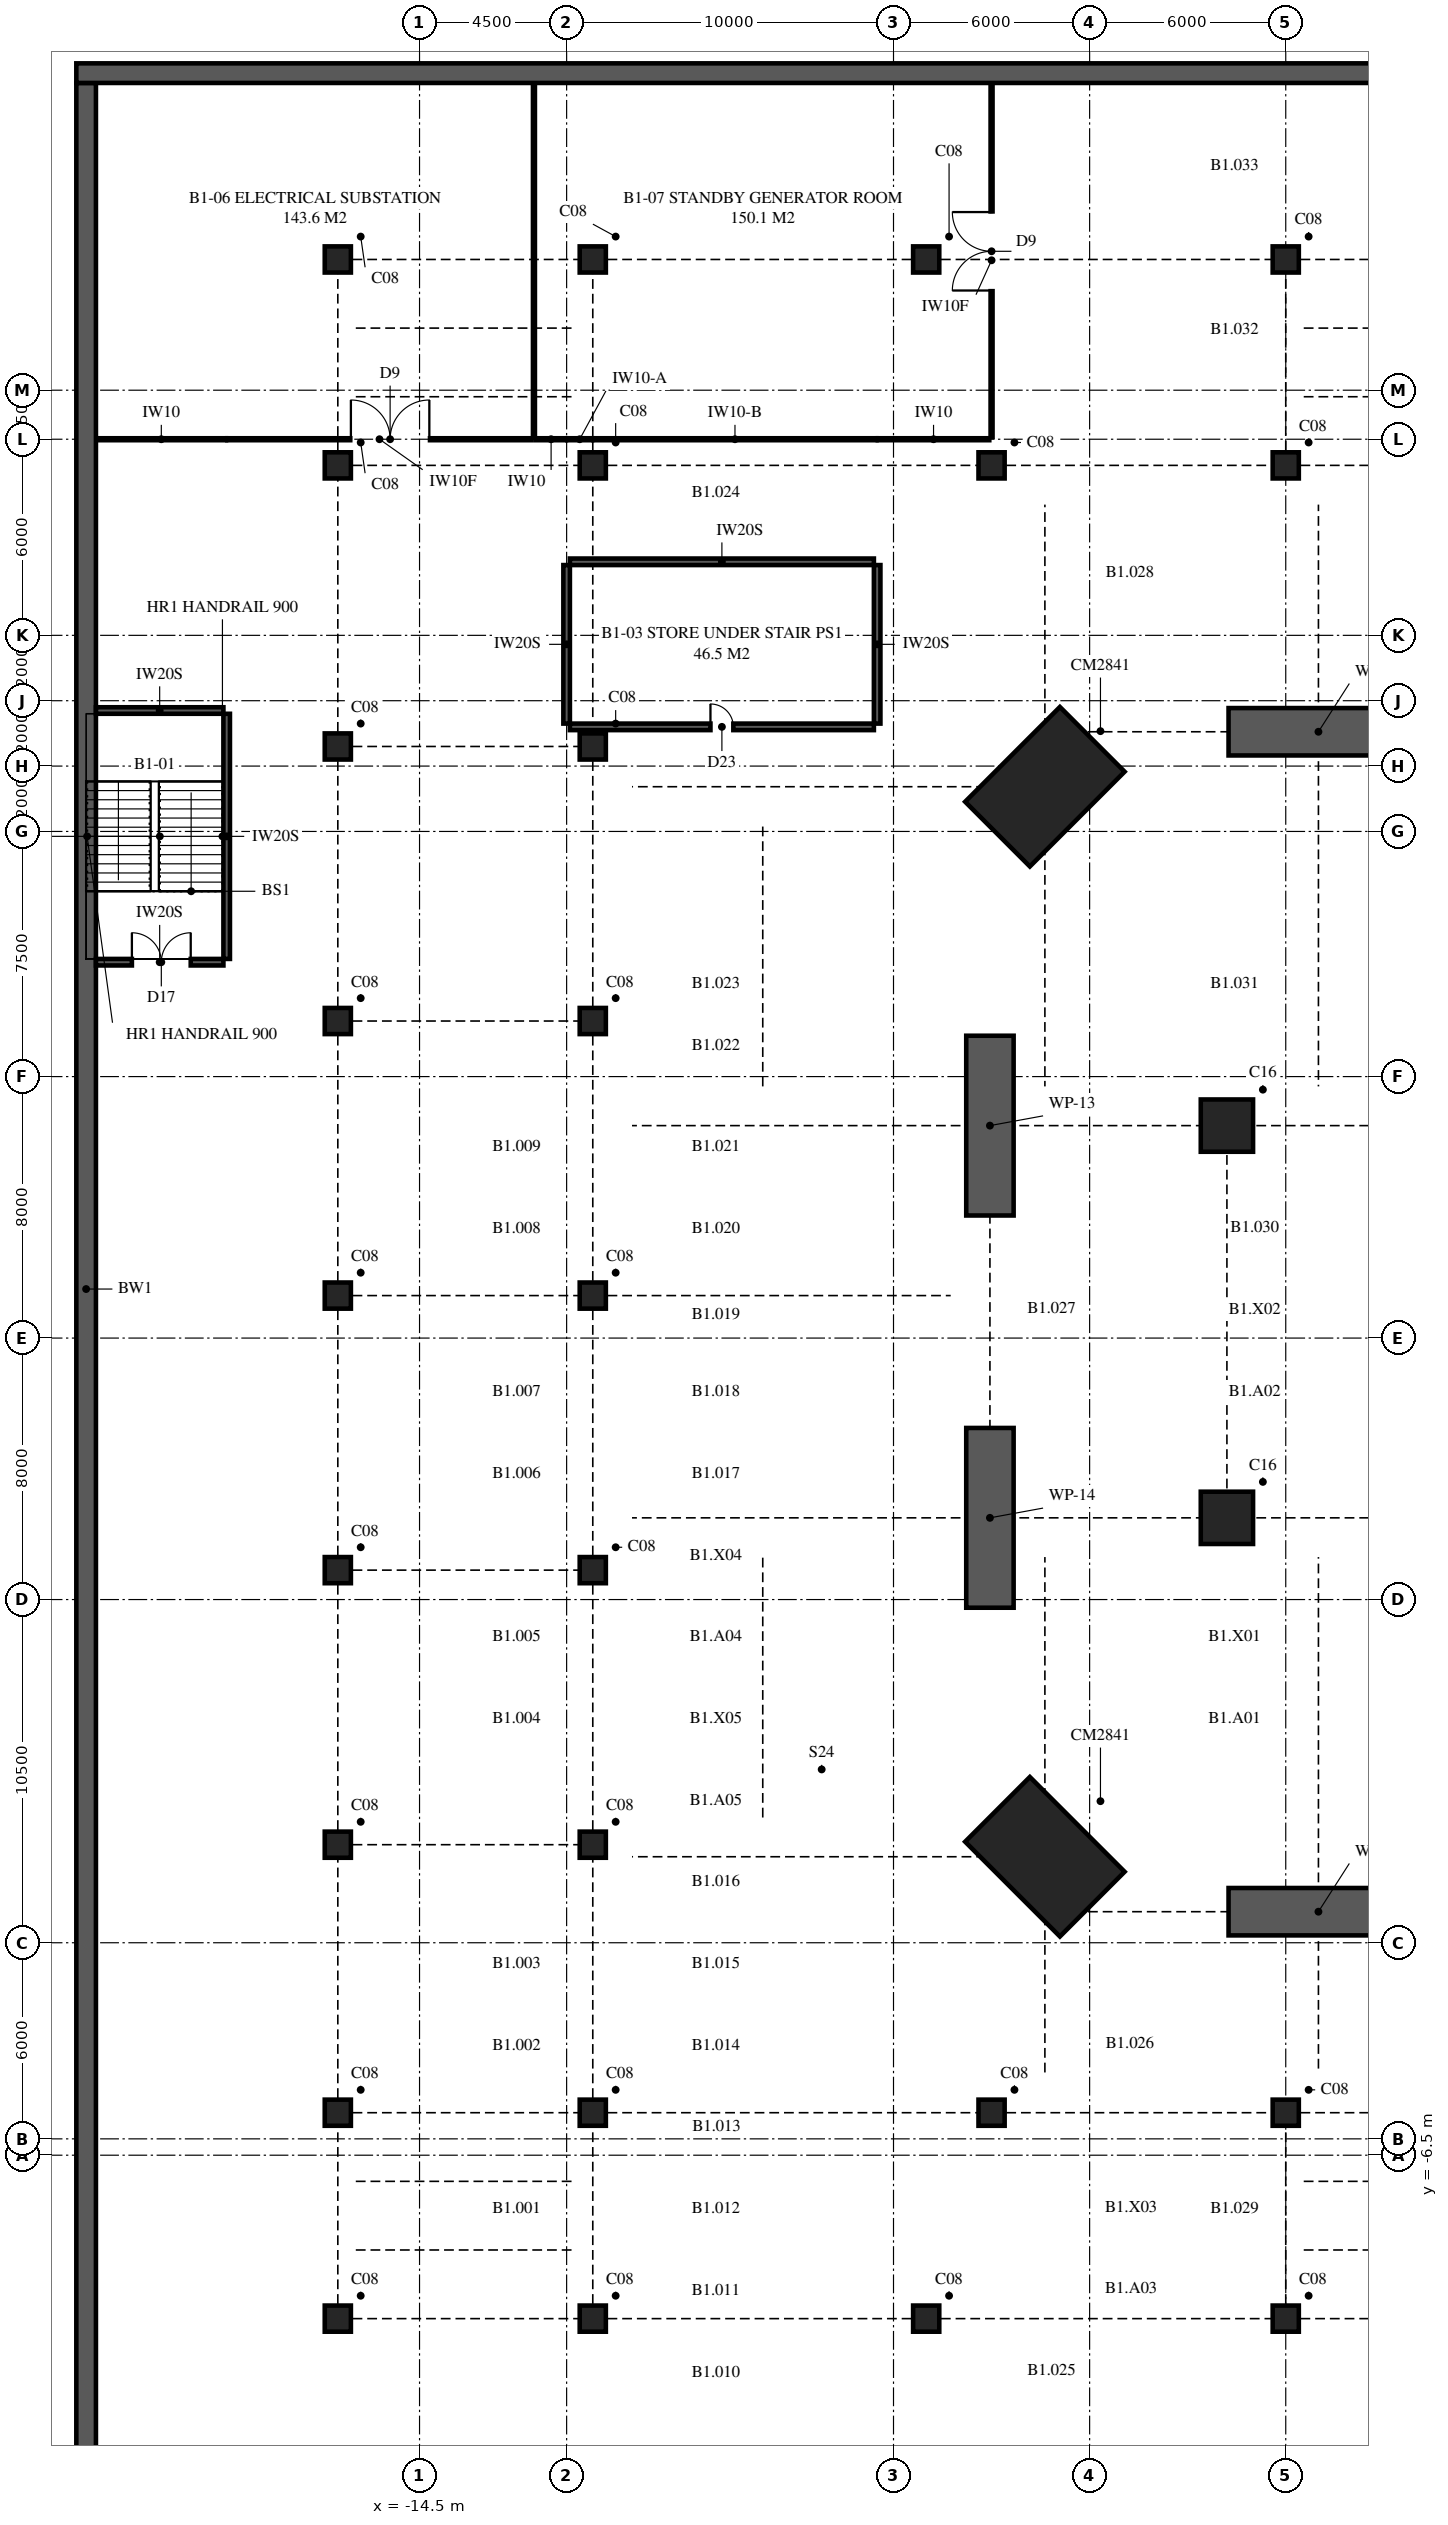
"""IFC4 building model, lengths in metres.
Left out: names, types, materials, properties, quantities, classifications, styles, units other than length and angle.
Written with IfcOpenShell. Run it as: python <this file> out.ifc"""

import sys

from ifc_helpers import new_model, si_unit, direction, frame, frame_2d, origin, origin_2d, place, context, subcontext, project, spatial, polyline, rectangle, outline, extrude, element, fill, save


model = new_model("IFC4")
c1 = context("Model", 3, precision=1e-05, world=origin(), true_north=direction((0.0, 1.0)))
c2 = subcontext(c1, "Body", "Model", "MODEL_VIEW")
j1 = project(units=[si_unit("LENGTHUNIT", "METRE"), si_unit("PLANEANGLEUNIT", "RADIAN")], contexts=[c1])
p1 = place(None, origin())
s1 = spatial("IfcSite", under=j1, at=p1, CompositionType="ELEMENT")
p2 = place(p1, origin())
s2 = spatial("IfcBuilding", under=s1, at=p2, CompositionType="ELEMENT")
p3 = place(p2, frame((0.0, 0.0, -4.0)))
s3 = spatial("IfcBuildingStorey", under=s2, at=p3, CompositionType="ELEMENT", Elevation=-4.0)
p4 = place(p3, frame((75.0, 57.2, 0.0), z_axis=(0.0, 0.0, 1.0), x_axis=(-1.0, 0.0, 0.0)))
e1 = element("IfcWall", 1, at=p4, inside=s3, PredefinedType="SOLIDWALL", context=c2, shape_type="SweptSolid", body=[
    extrude(rectangle(XDim=100.0, YDim=0.6, at=frame_2d((50.0, 0.0))), origin(), (0.0, 0.0, 1.0), 4.0),
])
p5 = place(p3, frame((-24.7, 56.9, 0.0), z_axis=(0.0, 0.0, 1.0), x_axis=(0.0, -1.0, 0.0)))
e2 = element("IfcWall", 2, at=p5, inside=s3, PredefinedType="SOLIDWALL", context=c2, shape_type="SweptSolid", body=[
    extrude(rectangle(XDim=73.8, YDim=0.6, at=frame_2d((36.9, 0.0))), origin(), (0.0, 0.0, 1.0), 4.0),
])
for number, where, z_axis, x_axis in (
    (3, (4.631, 2.631, 0.0), (0.0, 0.0, 1.0), (0.707, 0.707, 0.0)),
    (4, (4.631, 35.369, 0.0), (0.0, 0.0, 1.0), (0.707, -0.707, 0.0)),
):
    element("IfcColumn", number, at=place(p3, frame(where, z_axis=z_axis, x_axis=x_axis)), inside=s3, PredefinedType="COLUMN", context=c2, shape_type="SweptSolid", body=[
        extrude(rectangle(XDim=2.8, YDim=4.1, at=origin_2d()), origin(), (0.0, 0.0, 1.0), 4.0),
    ])
for number, where, z_axis, x_axis in (
    (5, (10.2, 13.0, 0.0), (0.0, 0.0, 1.0), (1.0, 0.0, 0.0)),
    (6, (10.2, 25.0, 0.0), (0.0, 0.0, 1.0), (1.0, 0.0, 0.0)),
):
    element("IfcColumn", number, at=place(p3, frame(where, z_axis=z_axis, x_axis=x_axis)), inside=s3, PredefinedType="COLUMN", context=c2, shape_type="SweptSolid", body=[
        extrude(rectangle(XDim=1.6, YDim=1.6, at=origin_2d()), origin(), (0.0, 0.0, 1.0), 4.0),
    ])
for number, where, z_axis, x_axis in (
    (7, (-9.2, -5.2, 0.0), (0.0, 0.0, 1.0), (1.0, 0.0, 0.0)),
    (8, (3.0, -5.2, 0.0), (0.0, 0.0, 1.0), (1.0, 0.0, 0.0)),
    (9, (12.0, -5.2, 0.0), (0.0, 0.0, 1.0), (1.0, 0.0, 0.0)),
    (10, (-9.2, 3.0, 0.0), (0.0, 0.0, 1.0), (1.0, 0.0, 0.0)),
    (11, (-9.2, 11.4, 0.0), (0.0, 0.0, 1.0), (1.0, 0.0, 0.0)),
    (12, (-9.2, 19.8, 0.0), (0.0, 0.0, 1.0), (1.0, 0.0, 0.0)),
    (13, (-9.2, 28.2, 0.0), (0.0, 0.0, 1.0), (1.0, 0.0, 0.0)),
    (14, (-9.2, 36.6, 0.0), (0.0, 0.0, 1.0), (1.0, 0.0, 0.0)),
    (15, (-9.2, 45.2, 0.0), (0.0, 0.0, 1.0), (1.0, 0.0, 0.0)),
    (16, (3.0, 45.2, 0.0), (0.0, 0.0, 1.0), (1.0, 0.0, 0.0)),
    (17, (12.0, 45.2, 0.0), (0.0, 0.0, 1.0), (1.0, 0.0, 0.0)),
):
    element("IfcColumn", number, at=place(p3, frame(where, z_axis=z_axis, x_axis=x_axis)), inside=s3, PredefinedType="COLUMN", context=c2, shape_type="SweptSolid", body=[
        extrude(rectangle(XDim=0.8, YDim=0.8, at=origin_2d()), origin(), (0.0, 0.0, 1.0), 4.0),
    ])
for number, where, z_axis, x_axis in (
    (18, (-17.0, -11.5, 0.0), (0.0, 0.0, 1.0), (1.0, 0.0, 0.0)),
    (19, (-17.0, -5.2, 0.0), (0.0, 0.0, 1.0), (1.0, 0.0, 0.0)),
    (20, (-17.0, 3.0, 0.0), (0.0, 0.0, 1.0), (1.0, 0.0, 0.0)),
    (21, (-17.0, 11.4, 0.0), (0.0, 0.0, 1.0), (1.0, 0.0, 0.0)),
    (22, (-17.0, 19.8, 0.0), (0.0, 0.0, 1.0), (1.0, 0.0, 0.0)),
    (23, (-17.0, 28.2, 0.0), (0.0, 0.0, 1.0), (1.0, 0.0, 0.0)),
    (24, (-17.0, 36.6, 0.0), (0.0, 0.0, 1.0), (1.0, 0.0, 0.0)),
    (25, (-17.0, 45.2, 0.0), (0.0, 0.0, 1.0), (1.0, 0.0, 0.0)),
    (26, (-17.0, 51.5, 0.0), (0.0, 0.0, 1.0), (1.0, 0.0, 0.0)),
    (27, (-9.2, -11.5, 0.0), (0.0, 0.0, 1.0), (1.0, 0.0, 0.0)),
    (28, (-9.2, 51.5, 0.0), (0.0, 0.0, 1.0), (1.0, 0.0, 0.0)),
    (29, (1.0, -11.5, 0.0), (0.0, 0.0, 1.0), (1.0, 0.0, 0.0)),
    (30, (1.0, 51.5, 0.0), (0.0, 0.0, 1.0), (1.0, 0.0, 0.0)),
    (31, (12.0, -11.5, 0.0), (0.0, 0.0, 1.0), (1.0, 0.0, 0.0)),
    (32, (12.0, 51.5, 0.0), (0.0, 0.0, 1.0), (1.0, 0.0, 0.0)),
):
    element("IfcColumn", number, at=place(p3, frame(where, z_axis=z_axis, x_axis=x_axis)), inside=s3, PredefinedType="COLUMN", context=c2, shape_type="SweptSolid", body=[
        extrude(rectangle(XDim=0.8, YDim=0.8, at=origin_2d()), origin(), (0.0, 0.0, 1.0), 3.6),
    ])
p6 = place(p3, frame((3.0, 46.05, 0.0), z_axis=(0.0, 0.0, 1.0), x_axis=(0.0, 1.0, 0.0)))
e33 = element("IfcWall", 33, at=p6, inside=s3, PredefinedType="PARTITIONING", context=c2, shape_type="SweptSolid", body=[
    extrude(outline(polyline([(0.0, 0.0), (10.85, 0.0), (10.85, 3.72), (6.01, 3.72), (6.01, 3.12), (4.89, 3.12), (4.89, 3.72), (0.41, 3.72), (0.41, 3.12), (0.0, 3.12), (0.0, 3.72), (0.0, 0.0)])), frame((0.0, 0.05, 0.0), z_axis=(0.0, -1.0, 0.0), x_axis=(1.0, 0.0, 0.0)), (0.0, 0.0, 1.0), 0.1),
])
p7 = place(p6, frame((4.5, 0.0, 0.0)))
e34 = element("IfcOpeningElement", 34, at=p7, cuts=e33, PredefinedType="OPENING", context=c2, shape_type="SweptSolid", body=[
    extrude(rectangle(XDim=2.4, YDim=2.4, at=frame_2d((1.2, 1.2))), frame((0.0, 0.06, 0.0), z_axis=(0.0, -1.0, 0.0), x_axis=(1.0, 0.0, 0.0)), (0.0, 0.0, 1.0), 0.12),
])
p8 = place(p3, frame((-20.4, 30.1, 0.0), z_axis=(0.0, 0.0, 1.0), x_axis=(0.0, 1.0, 0.0)))
e35 = element("IfcWall", 35, at=p8, inside=s3, PredefinedType="SOLIDWALL", context=c2, shape_type="SweptSolid", body=[
    extrude(rectangle(XDim=7.5, YDim=0.2, at=frame_2d((3.75, 0.0))), origin(), (0.0, 0.0, 1.0), 4.0),
])
p9 = place(p3, frame((-10.0, 37.3, 0.0), z_axis=(0.0, 0.0, 1.0), x_axis=(0.0, 1.0, 0.0)))
e36 = element("IfcWall", 36, at=p9, inside=s3, PredefinedType="SOLIDWALL", context=c2, shape_type="SweptSolid", body=[
    extrude(rectangle(XDim=4.85, YDim=0.2, at=frame_2d((2.425, 0.0))), origin(), (0.0, 0.0, 1.0), 4.0),
])
p10 = place(p3, frame((-20.4, 46.0, 0.0), z_axis=(0.0, 0.0, 1.0), x_axis=(1.0, 0.0, 0.0)))
e37 = element("IfcWall", 37, at=p10, inside=s3, PredefinedType="PARTITIONING", context=c2, shape_type="SweptSolid", body=[
    extrude(outline(polyline([(0.0, 0.0), (9.35, 0.0), (9.35, 3.72), (4.01, 3.72), (4.01, 3.12), (2.79, 3.12), (2.79, 3.72), (0.0, 3.72), (0.0, 0.0)])), frame((0.0, 0.05, 0.0), z_axis=(0.0, -1.0, 0.0), x_axis=(1.0, 0.0, 0.0)), (0.0, 0.0, 1.0), 0.1),
])
p11 = place(p10, frame((3.8, 0.0, 0.0)))
e38 = element("IfcOpeningElement", 38, at=p11, cuts=e37, PredefinedType="OPENING", context=c2, shape_type="SweptSolid", body=[
    extrude(rectangle(XDim=2.4, YDim=2.4, at=frame_2d((1.2, 1.2))), frame((0.0, 0.06, 0.0), z_axis=(0.0, -1.0, 0.0), x_axis=(1.0, 0.0, 0.0)), (0.0, 0.0, 1.0), 0.12),
])
p12 = place(p3, frame((-10.95, 46.0, 0.0), z_axis=(0.0, 0.0, 1.0), x_axis=(1.0, 0.0, 0.0)))
e39 = element("IfcWall", 39, at=p12, inside=s3, PredefinedType="PARTITIONING", context=c2, shape_type="SweptSolid", body=[
    extrude(rectangle(XDim=0.95, YDim=0.1, at=frame_2d((0.475, 0.0))), origin(), (0.0, 0.0, 1.0), 3.72),
])
p13 = place(p3, frame((-0.5, 37.3, 0.0), z_axis=(0.0, 0.0, 1.0), x_axis=(0.0, 1.0, 0.0)))
e40 = element("IfcWall", 40, at=p13, inside=s3, PredefinedType="SOLIDWALL", context=c2, shape_type="SweptSolid", body=[
    extrude(rectangle(XDim=4.85, YDim=0.2, at=frame_2d((2.425, 0.0))), origin(), (0.0, 0.0, 1.0), 4.0),
])
p14 = place(p3, frame((-0.5, 46.0, 0.0), z_axis=(0.0, 0.0, 1.0), x_axis=(1.0, 0.0, 0.0)))
e41 = element("IfcWall", 41, at=p14, inside=s3, PredefinedType="PARTITIONING", context=c2, shape_type="SweptSolid", body=[
    extrude(outline(polyline([(0.0, 0.0), (3.45, 0.0), (3.45, 3.72), (3.45, 3.12), (0.0, 3.12), (0.0, 3.72), (0.0, 0.0)])), frame((0.0, 0.05, 0.0), z_axis=(0.0, -1.0, 0.0), x_axis=(1.0, 0.0, 0.0)), (0.0, 0.0, 1.0), 0.1),
])
p15 = place(p3, frame((-9.9, 37.2, 0.0), z_axis=(0.0, 0.0, 1.0), x_axis=(1.0, 0.0, 0.0)))
e42 = element("IfcWall", 42, at=p15, inside=s3, PredefinedType="SOLIDWALL", context=c2, shape_type="SweptSolid", body=[
    extrude(rectangle(XDim=9.3, YDim=0.2, at=frame_2d((4.65, 0.0))), origin(), (0.0, 0.0, 1.0), 4.0),
])
p16 = place(p15, frame((4.3, 0.0, 0.0)))
e43 = element("IfcOpeningElement", 43, at=p16, cuts=e42, PredefinedType="OPENING", context=c2, shape_type="SweptSolid", body=[
    extrude(rectangle(XDim=0.7, YDim=2.1, at=frame_2d((0.35, 1.05))), frame((0.0, 0.11, 0.0), z_axis=(0.0, -1.0, 0.0), x_axis=(1.0, 0.0, 0.0)), (0.0, 0.0, 1.0), 0.22),
])
p17 = place(p3, frame((-9.9, 42.25, 0.0), z_axis=(0.0, 0.0, 1.0), x_axis=(1.0, 0.0, 0.0)))
e44 = element("IfcWall", 44, at=p17, inside=s3, PredefinedType="SOLIDWALL", context=c2, shape_type="SweptSolid", body=[
    extrude(rectangle(XDim=9.3, YDim=0.2, at=frame_2d((4.65, 0.0))), origin(), (0.0, 0.0, 1.0), 4.0),
])
p18 = place(p3, frame((-10.0, 46.0, 0.0), z_axis=(0.0, 0.0, 1.0), x_axis=(1.0, 0.0, 0.0)))
e45 = element("IfcWall", 45, at=p18, inside=s3, PredefinedType="PARTITIONING", context=c2, shape_type="SweptSolid", body=[
    extrude(outline(polyline([(0.0, 0.0), (0.8, 0.0), (0.8, 3.12), (0.19, 3.12), (0.19, 3.72), (0.0, 3.72), (0.0, 0.0)])), frame((0.0, 0.05, 0.0), z_axis=(0.0, -1.0, 0.0), x_axis=(1.0, 0.0, 0.0)), (0.0, 0.0, 1.0), 0.1),
])
p19 = place(p3, frame((-9.2, 46.0, 0.0), z_axis=(0.0, 0.0, 1.0), x_axis=(1.0, 0.0, 0.0)))
e46 = element("IfcWall", 46, at=p19, inside=s3, PredefinedType="PARTITIONING", context=c2, shape_type="SweptSolid", body=[
    extrude(rectangle(XDim=8.7, YDim=0.1, at=frame_2d((4.35, 0.0))), origin(), (0.0, 0.0, 1.0), 3.12),
])
p20 = place(p3, frame((-24.4, 30.0, 0.0), z_axis=(0.0, 0.0, 1.0), x_axis=(1.0, 0.0, 0.0)))
e47 = element("IfcWall", 47, at=p20, inside=s3, PredefinedType="SOLIDWALL", context=c2, shape_type="SweptSolid", body=[
    extrude(rectangle(XDim=3.9, YDim=0.2, at=frame_2d((1.95, 0.0))), origin(), (0.0, 0.0, 1.0), 4.0),
])
p21 = place(p20, frame((1.1, 0.0, 0.0)))
e48 = element("IfcOpeningElement", 48, at=p21, cuts=e47, PredefinedType="OPENING", context=c2, shape_type="SweptSolid", body=[
    extrude(rectangle(XDim=1.8, YDim=2.2, at=frame_2d((0.9, 1.1))), frame((0.0, 0.11, 0.0), z_axis=(0.0, -1.0, 0.0), x_axis=(1.0, 0.0, 0.0)), (0.0, 0.0, 1.0), 0.22),
])
p22 = place(p3, frame((-24.4, 37.7, 0.0), z_axis=(0.0, 0.0, 1.0), x_axis=(1.0, 0.0, 0.0)))
e49 = element("IfcWall", 49, at=p22, inside=s3, PredefinedType="SOLIDWALL", context=c2, shape_type="SweptSolid", body=[
    extrude(rectangle(XDim=3.9, YDim=0.2, at=frame_2d((1.95, 0.0))), origin(), (0.0, 0.0, 1.0), 4.0),
])
p23 = place(p3, frame((-24.4, 46.0, 0.0), z_axis=(0.0, 0.0, 1.0), x_axis=(1.0, 0.0, 0.0)))
e50 = element("IfcWall", 50, at=p23, inside=s3, PredefinedType="PARTITIONING", context=c2, shape_type="SweptSolid", body=[
    extrude(rectangle(XDim=4.0, YDim=0.1, at=frame_2d((2.0, 0.0))), origin(), (0.0, 0.0, 1.0), 3.72),
])
p24 = place(p3, frame((-11.0, 46.05, 0.0), z_axis=(0.0, 0.0, 1.0), x_axis=(0.0, 1.0, 0.0)))
e51 = element("IfcWall", 51, at=p24, inside=s3, PredefinedType="PARTITIONING", context=c2, shape_type="SweptSolid", body=[
    extrude(outline(polyline([(0.0, 0.0), (10.85, 0.0), (10.85, 3.72), (6.01, 3.72), (6.01, 3.12), (4.89, 3.12), (4.89, 3.72), (3.86, 3.72), (3.86, 3.22), (2.84, 3.22), (2.84, 3.72), (1.76, 3.72), (1.76, 3.22), (0.74, 3.22), (0.74, 3.72), (0.0, 3.72), (0.0, 0.0)])), frame((0.0, 0.05, 0.0), z_axis=(0.0, -1.0, 0.0), x_axis=(1.0, 0.0, 0.0)), (0.0, 0.0, 1.0), 0.1),
])
for number, where, z_axis, x_axis in (
    (52, (10.25, 0.95, 0.0), (0.0, 0.0, 1.0), (1.0, 0.0, 0.0)),
    (53, (10.25, 37.05, 0.0), (0.0, 0.0, 1.0), (1.0, 0.0, 0.0)),
    (54, (2.95, 22.25, 0.0), (0.0, 0.0, 1.0), (0.0, 1.0, 0.0)),
    (55, (2.95, 10.25, 0.0), (0.0, 0.0, 1.0), (0.0, 1.0, 0.0)),
):
    element("IfcWall", number, at=place(p3, frame(where, z_axis=z_axis, x_axis=x_axis)), inside=s3, PredefinedType="SHEAR", context=c2, shape_type="SweptSolid", body=[
        extrude(rectangle(XDim=5.5, YDim=1.45, at=frame_2d((2.75, 0.0))), origin(), (0.0, 0.0, 1.0), 4.0),
    ])
p25 = place(p11, origin())
e56 = element("IfcDoor", 56, at=p25, inside=s3, OperationType="DOUBLE_DOOR_SINGLE_SWING", PredefinedType="DOOR", context=c2, shape_type="SweptSolid", body=[
    extrude(rectangle(XDim=2.4, YDim=2.4, at=frame_2d((1.2, 1.2))), frame((0.0, 0.025, 0.0), z_axis=(0.0, -1.0, 0.0), x_axis=(1.0, 0.0, 0.0)), (0.0, 0.0, 1.0), 0.05),
])
fill(e38, e56)
p26 = place(p7, origin())
e57 = element("IfcDoor", 57, at=p26, inside=s3, OperationType="DOUBLE_DOOR_SINGLE_SWING", PredefinedType="DOOR", context=c2, shape_type="SweptSolid", body=[
    extrude(rectangle(XDim=2.4, YDim=2.4, at=frame_2d((1.2, 1.2))), frame((0.0, 0.025, 0.0), z_axis=(0.0, -1.0, 0.0), x_axis=(1.0, 0.0, 0.0)), (0.0, 0.0, 1.0), 0.05),
])
fill(e34, e57)
p27 = place(p21, origin())
e58 = element("IfcDoor", 58, at=p27, inside=s3, OperationType="DOUBLE_DOOR_SINGLE_SWING", PredefinedType="DOOR", context=c2, shape_type="SweptSolid", body=[
    extrude(rectangle(XDim=1.8, YDim=2.2, at=frame_2d((0.9, 1.1))), frame((0.0, 0.025, 0.0), z_axis=(0.0, -1.0, 0.0), x_axis=(1.0, 0.0, 0.0)), (0.0, 0.0, 1.0), 0.05),
])
fill(e48, e58)
p28 = place(p16, origin())
e59 = element("IfcDoor", 59, at=p28, inside=s3, OperationType="SINGLE_SWING_LEFT", PredefinedType="DOOR", context=c2, shape_type="SweptSolid", body=[
    extrude(rectangle(XDim=0.7, YDim=2.1, at=frame_2d((0.35, 1.05))), frame((0.0, 0.025, 0.0), z_axis=(0.0, -1.0, 0.0), x_axis=(1.0, 0.0, 0.0)), (0.0, 0.0, 1.0), 0.05),
])
fill(e43, e59)
save(model, sys.argv[1])
